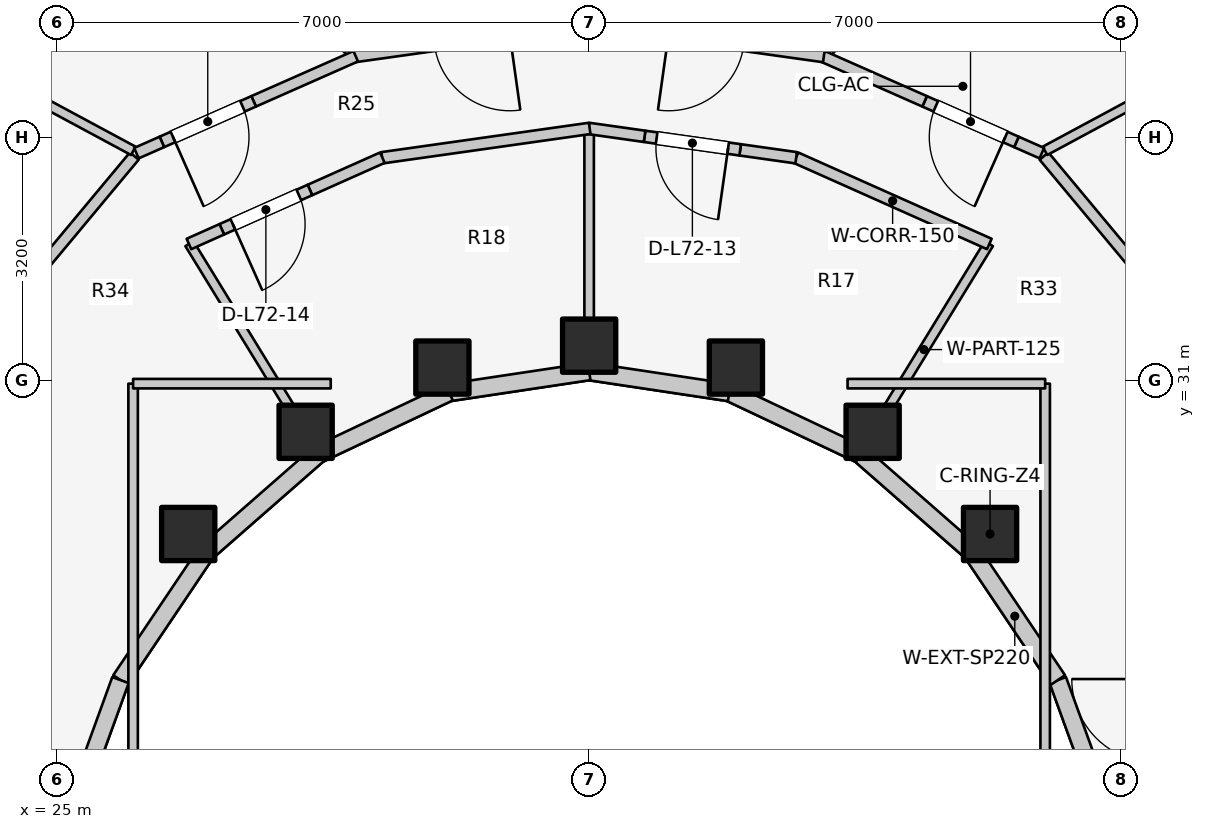
"""IFC4 building model, lengths in metres.
Left out: names, types, materials, properties, quantities, classifications, styles, units other than length and angle.
Written with IfcOpenShell. Run it as: python <this file> out.ifc"""

import sys

from ifc_helpers import new_model, si_unit, direction, frame, frame_2d, origin, origin_2d, place, context, subcontext, project, spatial, rectangle, extrude, element, fill, save


model = new_model("IFC4")
c1 = context("Model", 3, precision=1e-05, world=origin(), true_north=direction((0.0, 1.0)))
c2 = subcontext(c1, "Body", "Model", "MODEL_VIEW")
j1 = project(units=[si_unit("LENGTHUNIT", "METRE"), si_unit("PLANEANGLEUNIT", "RADIAN")], contexts=[c1])
p1 = place(None, origin())
s1 = spatial("IfcSite", under=j1, at=p1, CompositionType="ELEMENT")
p2 = place(p1, origin())
s2 = spatial("IfcBuilding", under=s1, at=p2, CompositionType="ELEMENT")
p3 = place(p2, frame((0.0, 0.0, 235.7)))
s3 = spatial("IfcBuildingStorey", under=s2, at=p3, CompositionType="ELEMENT", Elevation=235.7)
for number, where, z_axis, x_axis in (
    (1, (37.275, 28.982, 0.0), (0.0, 0.0, 1.0), (1.0, 0.0, 0.0)),
    (2, (35.73, 30.327, 0.0), (0.0, 0.0, 1.0), (1.0, 0.0, 0.0)),
    (3, (33.931, 31.172, 0.0), (0.0, 0.0, 1.0), (1.0, 0.0, 0.0)),
    (4, (32.0, 31.46, 0.0), (0.0, 0.0, 1.0), (1.0, 0.0, 0.0)),
    (5, (30.069, 31.172, 0.0), (0.0, 0.0, 1.0), (1.0, 0.0, 0.0)),
    (6, (28.27, 30.327, 0.0), (0.0, 0.0, 1.0), (1.0, 0.0, 0.0)),
    (7, (26.725, 28.982, 0.0), (0.0, 0.0, 1.0), (1.0, 0.0, 0.0)),
):
    element("IfcColumn", number, at=place(p3, frame(where, z_axis=z_axis, x_axis=x_axis)), inside=s3, PredefinedType="COLUMN", context=c2, shape_type="SweptSolid", body=[
        extrude(rectangle(XDim=0.7, YDim=0.7, at=origin_2d()), origin(), (0.0, 0.0, 1.0), 3.1),
    ])
p4 = place(p3, frame((38.877, 25.102, 0.0), z_axis=(0.0, 0.0, 1.0), x_axis=(-0.341423187295, 0.93990968033, 0.0)))
e8 = element("IfcWall", 8, at=p4, inside=s3, PredefinedType="STANDARD", context=c2, shape_type="SweptSolid", body=[
    extrude(rectangle(XDim=2.084, YDim=0.23, at=frame_2d((1.042, 0.0))), origin(), (0.0, 0.0, 1.0), 2.56),
])
p5 = place(p3, frame((38.166, 27.06, 0.0), z_axis=(0.0, 0.0, 1.0), x_axis=(-0.558197800898, 0.829707909492, 0.0)))
e9 = element("IfcWall", 9, at=p5, inside=s3, PredefinedType="STANDARD", context=c2, shape_type="SweptSolid", body=[
    extrude(rectangle(XDim=2.027, YDim=0.23, at=frame_2d((1.013, 0.0))), origin(), (0.0, 0.0, 1.0), 1.22),
])
p6 = place(p3, frame((37.035, 28.742, 0.0), z_axis=(0.0, 0.0, 1.0), x_axis=(-0.752576694707, 0.658504607869, 0.0)))
e10 = element("IfcWall", 10, at=p6, inside=s3, PredefinedType="STANDARD", context=c2, shape_type="SweptSolid", body=[
    extrude(rectangle(XDim=1.959, YDim=0.23, at=frame_2d((0.98, 0.0))), origin(), (0.0, 0.0, 1.0), 1.22),
])
p7 = place(p3, frame((35.56, 30.032, 0.0), z_axis=(0.0, 0.0, 1.0), x_axis=(-0.904179699603, 0.427152280606, 0.0)))
e11 = element("IfcWall", 11, at=p7, inside=s3, PredefinedType="STANDARD", context=c2, shape_type="SweptSolid", body=[
    extrude(rectangle(XDim=1.899, YDim=0.23, at=frame_2d((0.95, 0.0))), origin(), (0.0, 0.0, 1.0), 1.22),
])
for number, where, z_axis, x_axis in (
    (12, (33.843, 30.843, 0.0), (0.0, 0.0, 1.0), (-0.989, 0.149, 0.0)),
    (13, (32.0, 31.12, 0.0), (0.0, 0.0, 1.0), (-0.989, -0.149, 0.0)),
):
    element("IfcWall", number, at=place(p3, frame(where, z_axis=z_axis, x_axis=x_axis)), inside=s3, PredefinedType="STANDARD", context=c2, shape_type="SweptSolid", body=[
        extrude(rectangle(XDim=1.864, YDim=0.23, at=frame_2d((0.932, 0.0))), origin(), (0.0, 0.0, 1.0), 1.22),
    ])
p8 = place(p3, frame((30.157, 30.843, 0.0), z_axis=(0.0, 0.0, 1.0), x_axis=(-0.904179699603, -0.427152280606, 0.0)))
e14 = element("IfcWall", 14, at=p8, inside=s3, PredefinedType="STANDARD", context=c2, shape_type="SweptSolid", body=[
    extrude(rectangle(XDim=1.899, YDim=0.23, at=frame_2d((0.95, 0.0))), origin(), (0.0, 0.0, 1.0), 1.22),
])
p9 = place(p3, frame((28.44, 30.032, 0.0), z_axis=(0.0, 0.0, 1.0), x_axis=(-0.752576694707, -0.658504607869, 0.0)))
e15 = element("IfcWall", 15, at=p9, inside=s3, PredefinedType="STANDARD", context=c2, shape_type="SweptSolid", body=[
    extrude(rectangle(XDim=1.959, YDim=0.23, at=frame_2d((0.98, 0.0))), origin(), (0.0, 0.0, 1.0), 1.22),
])
p10 = place(p3, frame((26.965, 28.742, 0.0), z_axis=(0.0, 0.0, 1.0), x_axis=(-0.558197800898, -0.829707909492, 0.0)))
e16 = element("IfcWall", 16, at=p10, inside=s3, PredefinedType="STANDARD", context=c2, shape_type="SweptSolid", body=[
    extrude(rectangle(XDim=2.027, YDim=0.23, at=frame_2d((1.013, 0.0))), origin(), (0.0, 0.0, 1.0), 1.22),
])
p11 = place(p3, frame((25.834, 27.06, 0.0), z_axis=(0.0, 0.0, 1.0), x_axis=(-0.341423187295, -0.93990968033, 0.0)))
e17 = element("IfcWall", 17, at=p11, inside=s3, PredefinedType="STANDARD", context=c2, shape_type="SweptSolid", body=[
    extrude(rectangle(XDim=2.084, YDim=0.23, at=frame_2d((1.042, 0.0))), origin(), (0.0, 0.0, 1.0), 2.56),
])
p12 = place(p3, frame((35.55, 30.015, 0.0), z_axis=(0.0, 0.0, 1.0), x_axis=(0.522763432117, 0.852477796802, 0.0)))
e18 = element("IfcWall", 18, at=p12, inside=s3, PredefinedType="PARTITIONING", context=c2, shape_type="SweptSolid", body=[
    extrude(rectangle(XDim=3.269, YDim=0.125, at=frame_2d((1.635, 0.0))), origin(), (0.0, 0.0, 1.0), 1.22),
])
p13 = place(p3, frame((32.0, 31.1, 0.0), z_axis=(0.0, 0.0, 1.0), x_axis=(0.0, 1.0, 0.0)))
e19 = element("IfcWall", 19, at=p13, inside=s3, PredefinedType="PARTITIONING", context=c2, shape_type="SweptSolid", body=[
    extrude(rectangle(XDim=3.218, YDim=0.125, at=frame_2d((1.609, 0.0))), origin(), (0.0, 0.0, 1.0), 1.22),
])
p14 = place(p3, frame((28.45, 30.015, 0.0), z_axis=(0.0, 0.0, 1.0), x_axis=(-0.522763432117, 0.852477796802, 0.0)))
e20 = element("IfcWall", 20, at=p14, inside=s3, PredefinedType="PARTITIONING", context=c2, shape_type="SweptSolid", body=[
    extrude(rectangle(XDim=3.269, YDim=0.125, at=frame_2d((1.635, 0.0))), origin(), (0.0, 0.0, 1.0), 1.22),
])
p15 = place(p3, frame((37.265, 32.798, 0.0), z_axis=(0.0, 0.0, 1.0), x_axis=(-0.913254317828, 0.407389924971, 0.0)))
e21 = element("IfcWall", 21, at=p15, inside=s3, PredefinedType="PARTITIONING", context=c2, shape_type="SweptSolid", body=[
    extrude(rectangle(XDim=2.787, YDim=0.15, at=frame_2d((1.393, 0.0))), origin(), (0.0, 0.0, 1.0), 1.22),
])
p16 = place(p3, frame((34.724, 33.932, 0.0), z_axis=(0.0, 0.0, 1.0), x_axis=(-0.990190745647, 0.13972217875, 0.0)))
e22 = element("IfcWall", 22, at=p16, inside=s3, PredefinedType="PARTITIONING", context=c2, shape_type="SweptSolid", body=[
    extrude(rectangle(XDim=0.744, YDim=0.15, at=frame_2d((0.372, 0.0))), origin(), (0.0, 0.0, 1.0), 2.575),
])
p17 = place(p3, frame((33.987, 34.036, 0.0), z_axis=(0.0, 0.0, 1.0), x_axis=(-0.990133183593, 0.140129507055, 0.0)))
e23 = element("IfcWall", 23, at=p17, inside=s3, PredefinedType="PARTITIONING", context=c2, shape_type="SweptSolid", body=[
    extrude(rectangle(XDim=1.27, YDim=0.15, at=frame_2d((0.635, 0.0))), origin(), (0.0, 0.0, 1.0), 2.575),
])
p18 = place(p17, frame((0.16, 0.0, 0.0)))
e24 = element("IfcOpeningElement", 24, at=p18, cuts=e23, PredefinedType="OPENING", context=c2, shape_type="SweptSolid", body=[
    extrude(rectangle(XDim=0.95, YDim=2.1, at=frame_2d((0.475, 1.05))), frame((0.0, 0.085, 0.0), z_axis=(0.0, -1.0, 0.0), x_axis=(1.0, 0.0, 0.0)), (0.0, 0.0, 1.0), 0.17),
])
p19 = place(p3, frame((32.729, 34.214, 0.0), z_axis=(0.0, 0.0, 1.0), x_axis=(-0.990138882688, 0.140089232242, 0.0)))
e25 = element("IfcWall", 25, at=p19, inside=s3, PredefinedType="PARTITIONING", context=c2, shape_type="SweptSolid", body=[
    extrude(rectangle(XDim=0.744, YDim=0.15, at=frame_2d((0.372, 0.0))), origin(), (0.0, 0.0, 1.0), 1.22),
])
p20 = place(p3, frame((32.007, 34.318, 0.0), z_axis=(0.0, 0.0, 1.0), x_axis=(-0.990150268487, -0.140008734782, 0.0)))
e26 = element("IfcWall", 26, at=p20, inside=s3, PredefinedType="PARTITIONING", context=c2, shape_type="SweptSolid", body=[
    extrude(rectangle(XDim=2.759, YDim=0.15, at=frame_2d((1.379, 0.0))), origin(), (0.0, 0.0, 1.0), 1.22),
])
p21 = place(p3, frame((29.28, 33.933, 0.0), z_axis=(0.0, 0.0, 1.0), x_axis=(-0.913260714955, -0.407375584099, 0.0)))
e27 = element("IfcWall", 27, at=p21, inside=s3, PredefinedType="PARTITIONING", context=c2, shape_type="SweptSolid", body=[
    extrude(rectangle(XDim=1.043, YDim=0.15, at=frame_2d((0.522, 0.0))), origin(), (0.0, 0.0, 1.0), 1.22),
])
p22 = place(p3, frame((28.327, 33.508, 0.0), z_axis=(0.0, 0.0, 1.0), x_axis=(-0.913279660534, -0.40733310896, 0.0)))
e28 = element("IfcWall", 28, at=p22, inside=s3, PredefinedType="PARTITIONING", context=c2, shape_type="SweptSolid", body=[
    extrude(rectangle(XDim=1.27, YDim=0.15, at=frame_2d((0.635, 0.0))), origin(), (0.0, 0.0, 1.0), 2.16),
])
p23 = place(p22, frame((0.16, 0.0, 0.0)))
e29 = element("IfcOpeningElement", 29, at=p23, cuts=e28, PredefinedType="OPENING", context=c2, shape_type="SweptSolid", body=[
    extrude(rectangle(XDim=0.95, YDim=2.1, at=frame_2d((0.475, 1.05))), frame((0.0, 0.085, 0.0), z_axis=(0.0, -1.0, 0.0), x_axis=(1.0, 0.0, 0.0)), (0.0, 0.0, 1.0), 0.17),
])
p24 = place(p3, frame((27.167, 32.99, 0.0), z_axis=(0.0, 0.0, 1.0), x_axis=(-0.913172173043, -0.407574020737, 0.0)))
e30 = element("IfcWall", 30, at=p24, inside=s3, PredefinedType="PARTITIONING", context=c2, shape_type="SweptSolid", body=[
    extrude(rectangle(XDim=0.473, YDim=0.15, at=frame_2d((0.237, 0.0))), origin(), (0.0, 0.0, 1.0), 2.575),
])
p25 = place(p3, frame((26.0, 25.8, 0.0), z_axis=(0.0, 0.0, 1.0), x_axis=(0.0, 1.0, 0.0)))
e31 = element("IfcWall", 31, at=p25, inside=s3, PredefinedType="PARTITIONING", context=c2, shape_type="SweptSolid", body=[
    extrude(rectangle(XDim=5.16, YDim=0.125, at=frame_2d((2.58, 0.0))), origin(), (0.0, 0.0, 1.0), 1.952),
])
p26 = place(p3, frame((26.0, 30.96, 0.0), z_axis=(0.0, 0.0, 1.0), x_axis=(1.0, 0.0, 0.0)))
e32 = element("IfcWall", 32, at=p26, inside=s3, PredefinedType="PARTITIONING", context=c2, shape_type="SweptSolid", body=[
    extrude(rectangle(XDim=2.6, YDim=0.125, at=frame_2d((1.3, 0.0))), origin(), (0.0, 0.0, 1.0), 1.22),
])
p27 = place(p3, frame((38.0, 25.8, 0.0), z_axis=(0.0, 0.0, 1.0), x_axis=(0.0, 1.0, 0.0)))
e33 = element("IfcWall", 33, at=p27, inside=s3, PredefinedType="PARTITIONING", context=c2, shape_type="SweptSolid", body=[
    extrude(rectangle(XDim=5.16, YDim=0.125, at=frame_2d((2.58, 0.0))), origin(), (0.0, 0.0, 1.0), 1.952),
])
p28 = place(p3, frame((35.4, 30.96, 0.0), z_axis=(0.0, 0.0, 1.0), x_axis=(1.0, 0.0, 0.0)))
e34 = element("IfcWall", 34, at=p28, inside=s3, PredefinedType="PARTITIONING", context=c2, shape_type="SweptSolid", body=[
    extrude(rectangle(XDim=2.6, YDim=0.125, at=frame_2d((1.3, 0.0))), origin(), (0.0, 0.0, 1.0), 1.22),
])
for number, where, z_axis, x_axis in (
    (35, (37.984, 33.955, 0.0), (0.0, 0.0, 1.0), (0.64, -0.768, 0.0)),
    (36, (26.016, 33.955, 0.0), (0.0, 0.0, 1.0), (-0.64, -0.768, 0.0)),
):
    element("IfcWall", number, at=place(p3, frame(where, z_axis=z_axis, x_axis=x_axis)), inside=s3, PredefinedType="PARTITIONING", context=c2, shape_type="SweptSolid", body=[
        extrude(rectangle(XDim=2.21, YDim=0.15, at=frame_2d((1.105, 0.0))), origin(), (0.0, 0.0, 1.0), 1.22),
    ])
p29 = place(p3, frame((37.997, 34.023, 0.0), z_axis=(0.0, 0.0, 1.0), x_axis=(0.880531534665, 0.473987569943, 0.0)))
e37 = element("IfcWall", 37, at=p29, inside=s3, PredefinedType="PARTITIONING", context=c2, shape_type="SweptSolid", body=[
    extrude(rectangle(XDim=6.096, YDim=0.125, at=frame_2d((3.048, 0.0))), origin(), (0.0, 0.0, 1.0), 1.22),
])
for number, where, z_axis, x_axis in (
    (38, (35.118, 35.304, 0.0), (0.0, 0.0, 1.0), (0.702, 0.712, 0.0)),
    (39, (28.882, 35.304, 0.0), (0.0, 0.0, 1.0), (-0.702, 0.712, 0.0)),
):
    element("IfcWall", number, at=place(p3, frame(where, z_axis=z_axis, x_axis=x_axis)), inside=s3, PredefinedType="PARTITIONING", context=c2, shape_type="SweptSolid", body=[
        extrude(rectangle(XDim=5.184, YDim=0.125, at=frame_2d((2.592, 0.0))), origin(), (0.0, 0.0, 1.0), 1.22),
    ])
p30 = place(p3, frame((26.003, 34.023, 0.0), z_axis=(0.0, 0.0, 1.0), x_axis=(-0.880531534665, 0.473987569943, 0.0)))
e40 = element("IfcWall", 40, at=p30, inside=s3, PredefinedType="PARTITIONING", context=c2, shape_type="SweptSolid", body=[
    extrude(rectangle(XDim=6.096, YDim=0.125, at=frame_2d((3.048, 0.0))), origin(), (0.0, 0.0, 1.0), 1.22),
])
p31 = place(p3, frame((37.956, 33.992, 0.0), z_axis=(0.0, 0.0, 1.0), x_axis=(-0.91474391497, 0.404034119877, 0.0)))
e41 = element("IfcWall", 41, at=p31, inside=s3, PredefinedType="PARTITIONING", context=c2, shape_type="SweptSolid", body=[
    extrude(rectangle(XDim=0.366, YDim=0.15, at=frame_2d((0.183, 0.0))), origin(), (0.0, 0.0, 1.0), 2.575),
])
p32 = place(p3, frame((37.621, 34.14, 0.0), z_axis=(0.0, 0.0, 1.0), x_axis=(-0.914618215061, 0.404318588094, 0.0)))
e42 = element("IfcWall", 42, at=p32, inside=s3, PredefinedType="PARTITIONING", context=c2, shape_type="SweptSolid", body=[
    extrude(rectangle(XDim=1.32, YDim=0.15, at=frame_2d((0.66, 0.0))), origin(), (0.0, 0.0, 1.0), 2.16),
])
p33 = place(p32, frame((0.16, 0.0, 0.0)))
e43 = element("IfcOpeningElement", 43, at=p33, cuts=e42, PredefinedType="OPENING", context=c2, shape_type="SweptSolid", body=[
    extrude(rectangle(XDim=1.0, YDim=2.1, at=frame_2d((0.5, 1.05))), frame((0.0, 0.085, 0.0), z_axis=(0.0, -1.0, 0.0), x_axis=(1.0, 0.0, 0.0)), (0.0, 0.0, 1.0), 0.17),
])
p34 = place(p3, frame((36.414, 34.674, 0.0), z_axis=(0.0, 0.0, 1.0), x_axis=(-0.914639417368, 0.404270622476, 0.0)))
e44 = element("IfcWall", 44, at=p34, inside=s3, PredefinedType="PARTITIONING", context=c2, shape_type="SweptSolid", body=[
    extrude(rectangle(XDim=1.468, YDim=0.15, at=frame_2d((0.734, 0.0))), origin(), (0.0, 0.0, 1.0), 1.22),
])
p35 = place(p3, frame((35.087, 35.263, 0.0), z_axis=(0.0, 0.0, 1.0), x_axis=(-0.990260655864, 0.139225836137, 0.0)))
e45 = element("IfcWall", 45, at=p35, inside=s3, PredefinedType="PARTITIONING", context=c2, shape_type="SweptSolid", body=[
    extrude(rectangle(XDim=0.903, YDim=0.15, at=frame_2d((0.452, 0.0))), origin(), (0.0, 0.0, 1.0), 2.105),
])
p36 = place(p3, frame((34.193, 35.389, 0.0), z_axis=(0.0, 0.0, 1.0), x_axis=(-0.990279679751, 0.139090459315, 0.0)))
e46 = element("IfcWall", 46, at=p36, inside=s3, PredefinedType="PARTITIONING", context=c2, shape_type="SweptSolid", body=[
    extrude(rectangle(XDim=1.32, YDim=0.15, at=frame_2d((0.66, 0.0))), origin(), (0.0, 0.0, 1.0), 2.16),
])
p37 = place(p36, frame((0.16, 0.0, 0.0)))
e47 = element("IfcOpeningElement", 47, at=p37, cuts=e46, PredefinedType="OPENING", context=c2, shape_type="SweptSolid", body=[
    extrude(rectangle(XDim=1.0, YDim=2.1, at=frame_2d((0.5, 1.05))), frame((0.0, 0.085, 0.0), z_axis=(0.0, -1.0, 0.0), x_axis=(1.0, 0.0, 0.0)), (0.0, 0.0, 1.0), 0.17),
])
p38 = place(p3, frame((31.114, 35.572, 0.0), z_axis=(0.0, 0.0, 1.0), x_axis=(-0.990279679751, -0.139090459315, 0.0)))
e48 = element("IfcWall", 48, at=p38, inside=s3, PredefinedType="PARTITIONING", context=c2, shape_type="SweptSolid", body=[
    extrude(rectangle(XDim=1.32, YDim=0.15, at=frame_2d((0.66, 0.0))), origin(), (0.0, 0.0, 1.0), 2.16),
])
p39 = place(p38, frame((0.16, 0.0, 0.0)))
e49 = element("IfcOpeningElement", 49, at=p39, cuts=e48, PredefinedType="OPENING", context=c2, shape_type="SweptSolid", body=[
    extrude(rectangle(XDim=1.0, YDim=2.1, at=frame_2d((0.5, 1.05))), frame((0.0, 0.085, 0.0), z_axis=(0.0, -1.0, 0.0), x_axis=(1.0, 0.0, 0.0)), (0.0, 0.0, 1.0), 0.17),
])
p40 = place(p3, frame((29.807, 35.389, 0.0), z_axis=(0.0, 0.0, 1.0), x_axis=(-0.990260655864, -0.139225836137, 0.0)))
e50 = element("IfcWall", 50, at=p40, inside=s3, PredefinedType="PARTITIONING", context=c2, shape_type="SweptSolid", body=[
    extrude(rectangle(XDim=0.903, YDim=0.15, at=frame_2d((0.452, 0.0))), origin(), (0.0, 0.0, 1.0), 2.105),
])
p41 = place(p3, frame((28.929, 35.268, 0.0), z_axis=(0.0, 0.0, 1.0), x_axis=(-0.91466659005, -0.404209140231, 0.0)))
e51 = element("IfcWall", 51, at=p41, inside=s3, PredefinedType="PARTITIONING", context=c2, shape_type="SweptSolid", body=[
    extrude(rectangle(XDim=1.468, YDim=0.15, at=frame_2d((0.734, 0.0))), origin(), (0.0, 0.0, 1.0), 1.22),
])
p42 = place(p3, frame((27.586, 34.674, 0.0), z_axis=(0.0, 0.0, 1.0), x_axis=(-0.914618215061, -0.404318588094, 0.0)))
e52 = element("IfcWall", 52, at=p42, inside=s3, PredefinedType="PARTITIONING", context=c2, shape_type="SweptSolid", body=[
    extrude(rectangle(XDim=1.32, YDim=0.15, at=frame_2d((0.66, 0.0))), origin(), (0.0, 0.0, 1.0), 2.16),
])
p43 = place(p42, frame((0.16, 0.0, 0.0)))
e53 = element("IfcOpeningElement", 53, at=p43, cuts=e52, PredefinedType="OPENING", context=c2, shape_type="SweptSolid", body=[
    extrude(rectangle(XDim=1.0, YDim=2.1, at=frame_2d((0.5, 1.05))), frame((0.0, 0.085, 0.0), z_axis=(0.0, -1.0, 0.0), x_axis=(1.0, 0.0, 0.0)), (0.0, 0.0, 1.0), 0.17),
])
p44 = place(p3, frame((26.378, 34.14, 0.0), z_axis=(0.0, 0.0, 1.0), x_axis=(-0.914634977088, -0.404280668209, 0.0)))
e54 = element("IfcWall", 54, at=p44, inside=s3, PredefinedType="PARTITIONING", context=c2, shape_type="SweptSolid", body=[
    extrude(rectangle(XDim=0.366, YDim=0.15, at=frame_2d((0.183, 0.0))), origin(), (0.0, 0.0, 1.0), 2.575),
])
p45 = place(p18, origin())
e55 = element("IfcDoor", 55, at=p45, inside=s3, OperationType="SINGLE_SWING_LEFT", PredefinedType="DOOR", context=c2, shape_type="SweptSolid", body=[
    extrude(rectangle(XDim=0.95, YDim=2.1, at=frame_2d((0.475, 1.05))), frame((0.0, 0.025, 0.0), z_axis=(0.0, -1.0, 0.0), x_axis=(1.0, 0.0, 0.0)), (0.0, 0.0, 1.0), 0.05),
])
fill(e24, e55)
p46 = place(p23, origin())
e56 = element("IfcDoor", 56, at=p46, inside=s3, OperationType="SINGLE_SWING_RIGHT", PredefinedType="DOOR", context=c2, shape_type="SweptSolid", body=[
    extrude(rectangle(XDim=0.95, YDim=2.1, at=frame_2d((0.475, 1.05))), frame((0.0, 0.025, 0.0), z_axis=(0.0, -1.0, 0.0), x_axis=(1.0, 0.0, 0.0)), (0.0, 0.0, 1.0), 0.05),
])
fill(e29, e56)
p47 = place(p33, origin())
e57 = element("IfcDoor", 57, at=p47, inside=s3, OperationType="SINGLE_SWING_LEFT", PredefinedType="DOOR", context=c2, shape_type="SweptSolid", body=[
    extrude(rectangle(XDim=1.0, YDim=2.1, at=frame_2d((0.5, 1.05))), frame((0.0, 0.025, 0.0), z_axis=(0.0, -1.0, 0.0), x_axis=(1.0, 0.0, 0.0)), (0.0, 0.0, 1.0), 0.05),
])
fill(e43, e57)
p48 = place(p43, origin())
e58 = element("IfcDoor", 58, at=p48, inside=s3, OperationType="SINGLE_SWING_RIGHT", PredefinedType="DOOR", context=c2, shape_type="SweptSolid", body=[
    extrude(rectangle(XDim=1.0, YDim=2.1, at=frame_2d((0.5, 1.05))), frame((0.0, 0.025, 0.0), z_axis=(0.0, -1.0, 0.0), x_axis=(1.0, 0.0, 0.0)), (0.0, 0.0, 1.0), 0.05),
])
fill(e53, e58)
save(model, sys.argv[1])
